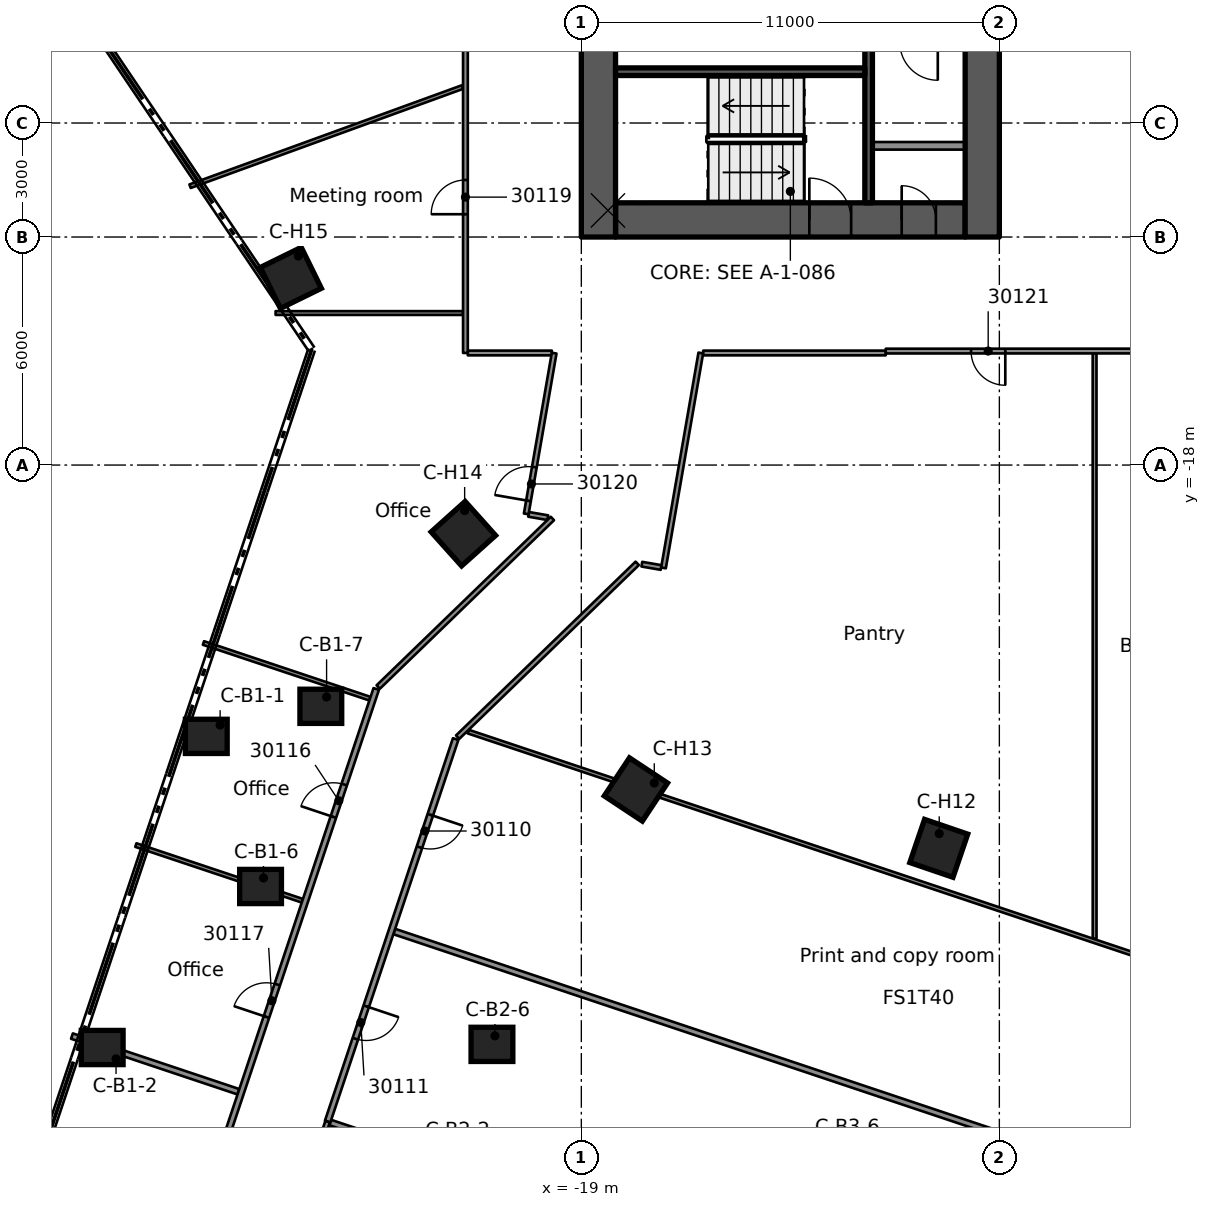
"""IFC4 building model, lengths in metres.
Left out: names, types, materials, properties, quantities, classifications, styles, units other than length and angle.
Written with IfcOpenShell. Run it as: python <this file> out.ifc"""

import sys

from ifc_helpers import new_model, si_unit, direction, frame, frame_2d, origin, origin_2d, place, context, subcontext, project, spatial, rectangle, extrude, element, fill, save


model = new_model("IFC4")
c1 = context("Model", 3, precision=1e-05, world=origin(), true_north=direction((0.0, 1.0)))
c2 = subcontext(c1, "Body", "Model", "MODEL_VIEW")
j1 = project(units=[si_unit("LENGTHUNIT", "METRE"), si_unit("PLANEANGLEUNIT", "RADIAN")], contexts=[c1])
p1 = place(None, origin())
s1 = spatial("IfcSite", under=j1, at=p1, CompositionType="ELEMENT")
p2 = place(p1, origin())
s2 = spatial("IfcBuilding", under=s1, at=p2, CompositionType="ELEMENT")
p3 = place(p2, frame((0.0, 0.0, 152.6)))
s3 = spatial("IfcBuildingStorey", under=s2, at=p3, CompositionType="ELEMENT", Elevation=152.6)
p4 = place(p3, frame((-18.1, -11.55, 0.0), z_axis=(0.0, 0.0, 1.0), x_axis=(1.0, 0.0, 0.0)))
e1 = element("IfcWall", 1, at=p4, inside=s3, PredefinedType="SHEAR", context=c2, shape_type="SweptSolid", body=[
    extrude(rectangle(XDim=9.2, YDim=0.9, at=frame_2d((4.6, 0.0))), origin(), (0.0, 0.0, 1.0), 3.5),
])
p5 = place(p4, frame((5.1, 0.0, 0.0)))
e2 = element("IfcOpeningElement", 2, at=p5, cuts=e1, PredefinedType="OPENING", context=c2, shape_type="SweptSolid", body=[
    extrude(rectangle(XDim=1.1, YDim=2.1, at=frame_2d((0.55, 1.05))), frame((0.0, 0.46, 0.0), z_axis=(0.0, -1.0, 0.0), x_axis=(1.0, 0.0, 0.0)), (0.0, 0.0, 1.0), 0.92),
])
p6 = place(p4, frame((7.53, 0.0, 0.0)))
e3 = element("IfcOpeningElement", 3, at=p6, cuts=e1, PredefinedType="OPENING", context=c2, shape_type="SweptSolid", body=[
    extrude(rectangle(XDim=0.9, YDim=2.1, at=frame_2d((0.45, 1.05))), frame((0.0, 0.46, 0.0), z_axis=(0.0, -1.0, 0.0), x_axis=(1.0, 0.0, 0.0)), (0.0, 0.0, 1.0), 0.92),
])
p7 = place(p3, frame((-18.55, -12.0, 0.0), z_axis=(0.0, 0.0, 1.0), x_axis=(0.0, 1.0, 0.0)))
e4 = element("IfcWall", 4, at=p7, inside=s3, PredefinedType="SHEAR", context=c2, shape_type="SweptSolid", body=[
    extrude(rectangle(XDim=24.0, YDim=0.9, at=frame_2d((12.0, 0.0))), origin(), (0.0, 0.0, 1.0), 3.5),
])
p8 = place(p7, frame((10.1, 0.0, 0.0)))
e5 = element("IfcOpeningElement", 5, at=p8, cuts=e4, PredefinedType="OPENING", context=c2, shape_type="SweptSolid", body=[
    extrude(rectangle(XDim=1.8, YDim=2.1, at=frame_2d((0.9, 1.05))), frame((0.0, 0.46, 0.0), z_axis=(0.0, -1.0, 0.0), x_axis=(1.0, 0.0, 0.0)), (0.0, 0.0, 1.0), 0.92),
])
p9 = place(p3, frame((-8.45, -12.0, 0.0), z_axis=(0.0, 0.0, 1.0), x_axis=(0.0, 1.0, 0.0)))
e6 = element("IfcWall", 6, at=p9, inside=s3, PredefinedType="SHEAR", context=c2, shape_type="SweptSolid", body=[
    extrude(rectangle(XDim=24.0, YDim=0.9, at=frame_2d((12.0, 0.0))), origin(), (0.0, 0.0, 1.0), 3.5),
])
p10 = place(p9, frame((9.6, 0.0, 0.0)))
e7 = element("IfcOpeningElement", 7, at=p10, cuts=e6, PredefinedType="OPENING", context=c2, shape_type="SweptSolid", body=[
    extrude(rectangle(XDim=1.8, YDim=2.1, at=frame_2d((0.9, 1.05))), frame((0.0, 0.46, 0.0), z_axis=(0.0, -1.0, 0.0), x_axis=(1.0, 0.0, 0.0)), (0.0, 0.0, 1.0), 0.92),
])
p11 = place(p9, frame((19.65, 0.0, 0.0)))
e8 = element("IfcOpeningElement", 8, at=p11, cuts=e6, PredefinedType="OPENING", context=c2, shape_type="SweptSolid", body=[
    extrude(rectangle(XDim=1.1, YDim=2.1, at=frame_2d((0.55, 1.05))), frame((0.0, 0.46, 0.0), z_axis=(0.0, -1.0, 0.0), x_axis=(1.0, 0.0, 0.0)), (0.0, 0.0, 1.0), 0.92),
])
for number, where, z_axis, x_axis in (
    (9, (-28.869, -25.139, 0.0), (0.0, 0.0, 1.0), (1.0, 0.0, 0.0)),
    (10, (-31.608, -33.326, 0.0), (0.0, 0.0, 1.0), (1.0, 0.0, 0.0)),
    (11, (-27.441, -29.089, 0.0), (0.0, 0.0, 1.0), (1.0, 0.0, 0.0)),
    (12, (-25.855, -24.348, 0.0), (0.0, 0.0, 1.0), (1.0, 0.0, 0.0)),
    (13, (-21.352, -33.243, 0.0), (0.0, 0.0, 1.0), (1.0, 0.0, 0.0)),
):
    element("IfcColumn", number, at=place(p3, frame(where, z_axis=z_axis, x_axis=x_axis)), inside=s3, PredefinedType="COLUMN", context=c2, shape_type="SweptSolid", body=[
        extrude(rectangle(XDim=1.1, YDim=0.9, at=origin_2d()), origin(), (0.0, 0.0, 1.0), 3.5),
    ])
for number, where, z_axis, x_axis in (
    (14, (-9.594, -28.085, 0.0), (0.0, 0.0, 1.0), (-0.323, -0.946, 0.0)),
    (15, (-17.564, -26.536, 0.0), (0.0, 0.0, 1.0), (-0.552, -0.834, 0.0)),
    (16, (-22.104, -19.806, 0.0), (0.0, 0.0, 1.0), (-0.745, -0.667, 0.0)),
    (17, (-26.644, -13.075, 0.0), (0.0, 0.0, 1.0), (-0.898, -0.441, 0.0)),
):
    element("IfcColumn", number, at=place(p3, frame(where, z_axis=z_axis, x_axis=x_axis)), inside=s3, PredefinedType="COLUMN", context=c2, shape_type="SweptSolid", body=[
        extrude(rectangle(XDim=1.2, YDim=1.2, at=origin_2d()), origin(), (0.0, 0.0, 1.0), 3.5),
    ])
p12 = place(p3, frame((-11.44, -11.1, 0.0), z_axis=(0.0, 0.0, 1.0), x_axis=(0.0, 1.0, 0.0)))
e18 = element("IfcWall", 18, at=p12, inside=s3, PredefinedType="SOLIDWALL", context=c2, shape_type="SweptSolid", body=[
    extrude(rectangle(XDim=4.125, YDim=0.2, at=frame_2d((2.062, 0.0))), origin(), (0.0, 0.0, 1.0), 3.09),
])
p13 = place(p3, frame((-11.54, -7.65, 0.0), z_axis=(0.0, 0.0, 1.0), x_axis=(-1.0, 0.0, 0.0)))
e19 = element("IfcWall", 19, at=p13, inside=s3, PredefinedType="SOLIDWALL", context=c2, shape_type="SweptSolid", body=[
    extrude(rectangle(XDim=6.56, YDim=0.2, at=frame_2d((3.28, 0.0))), origin(), (0.0, 0.0, 1.0), 3.09),
])
p14 = place(p3, frame((-8.9, -9.6, 0.0), z_axis=(0.0, 0.0, 1.0), x_axis=(-1.0, 0.0, 0.0)))
e20 = element("IfcWall", 20, at=p14, inside=s3, PredefinedType="PARTITIONING", context=c2, shape_type="SweptSolid", body=[
    extrude(rectangle(XDim=2.44, YDim=0.2, at=frame_2d((1.22, 0.0))), origin(), (0.0, 0.0, 1.0), 3.09),
])
p15 = place(p3, frame((-5.494, -15.062, 0.0), z_axis=(0.0, 0.0, 1.0), x_axis=(6.3425617e-05, -0.999999997989, 0.0)))
e21 = element("IfcWall", 21, at=p15, inside=s3, PredefinedType="PARTITIONING", context=c2, shape_type="SweptSolid", body=[
    extrude(rectangle(XDim=15.397, YDim=0.1, at=frame_2d((7.698, 0.0))), origin(), (0.0, 0.0, 1.0), 3.08),
])
p16 = place(p3, frame((-32.404, -33.025, 0.0), z_axis=(0.0, 0.0, 1.0), x_axis=(0.948376327841, -0.317147191049, 0.0)))
e22 = element("IfcWall", 22, at=p16, inside=s3, PredefinedType="PARTITIONING", context=c2, shape_type="SweptSolid", body=[
    extrude(rectangle(XDim=4.62, YDim=0.15, at=frame_2d((2.31, 0.0))), origin(), (0.0, 0.0, 1.0), 3.08),
])
p17 = place(p3, frame((-25.605, -35.3, 0.0), z_axis=(0.0, 0.0, 1.0), x_axis=(0.948327152728, -0.317294203223, 0.0)))
e23 = element("IfcWall", 23, at=p17, inside=s3, PredefinedType="PARTITIONING", context=c2, shape_type="SweptSolid", body=[
    extrude(rectangle(XDim=26.162, YDim=0.15, at=frame_2d((13.081, 0.0))), origin(), (0.0, 0.0, 1.0), 3.08),
])
p18 = place(p3, frame((-30.722, -27.999, 0.0), z_axis=(0.0, 0.0, 1.0), x_axis=(0.948349739438, -0.317226688203, 0.0)))
e24 = element("IfcWall", 24, at=p18, inside=s3, PredefinedType="PARTITIONING", context=c2, shape_type="SweptSolid", body=[
    extrude(rectangle(XDim=4.618, YDim=0.1, at=frame_2d((2.309, 0.0))), origin(), (0.0, 0.0, 1.0), 3.08),
])
p19 = place(p3, frame((-23.923, -30.274, 0.0), z_axis=(0.0, 0.0, 1.0), x_axis=(0.948327152728, -0.317294203223, 0.0)))
e25 = element("IfcWall", 25, at=p19, inside=s3, PredefinedType="PARTITIONING", context=c2, shape_type="SweptSolid", body=[
    extrude(rectangle(XDim=26.162, YDim=0.15, at=frame_2d((13.081, 0.0))), origin(), (0.0, 0.0, 1.0), 3.08),
])
p20 = place(p3, frame((-28.943, -22.682, 0.0), z_axis=(0.0, 0.0, 1.0), x_axis=(0.948355058718, -0.317210785763, 0.0)))
e26 = element("IfcWall", 26, at=p20, inside=s3, PredefinedType="PARTITIONING", context=c2, shape_type="SweptSolid", body=[
    extrude(rectangle(XDim=4.619, YDim=0.1, at=frame_2d((2.309, 0.0))), origin(), (0.0, 0.0, 1.0), 3.08),
])
p21 = place(p3, frame((-21.98, -25.012, 0.0), z_axis=(0.0, 0.0, 1.0), x_axis=(0.948316725504, -0.31732536635, 0.0)))
e27 = element("IfcWall", 27, at=p21, inside=s3, PredefinedType="PARTITIONING", context=c2, shape_type="SweptSolid", body=[
    extrude(rectangle(XDim=25.819, YDim=0.1, at=frame_2d((12.91, 0.0))), origin(), (0.0, 0.0, 1.0), 3.08),
])
p22 = place(p3, frame((-17.408, -20.608, 0.0), z_axis=(0.0, 0.0, 1.0), x_axis=(0.985229157149, -0.171241081238, 0.0)))
e28 = element("IfcWall", 28, at=p22, inside=s3, PredefinedType="PARTITIONING", context=c2, shape_type="SweptSolid", body=[
    extrude(rectangle(XDim=0.515, YDim=0.125, at=frame_2d((0.257, 0.0))), origin(), (0.0, 0.0, 1.0), 3.08),
])
p23 = place(p3, frame((-20.387, -19.297, 0.0), z_axis=(0.0, 0.0, 1.0), x_axis=(0.985183769906, -0.171502010235, 0.0)))
e29 = element("IfcWall", 29, at=p23, inside=s3, PredefinedType="PARTITIONING", context=c2, shape_type="SweptSolid", body=[
    extrude(rectangle(XDim=0.512, YDim=0.125, at=frame_2d((0.256, 0.0))), origin(), (0.0, 0.0, 1.0), 3.08),
])
p24 = place(p3, frame((-21.988, -15.051, 0.0), z_axis=(0.0, 0.0, 1.0), x_axis=(1.0, 0.0, 0.0)))
e30 = element("IfcWall", 30, at=p24, inside=s3, PredefinedType="PARTITIONING", context=c2, shape_type="SweptSolid", body=[
    extrude(rectangle(XDim=2.212, YDim=0.125, at=frame_2d((1.106, 0.0))), origin(), (0.0, 0.0, 1.0), 3.08),
])
p25 = place(p3, frame((-15.793, -15.051, 0.0), z_axis=(0.0, 0.0, 1.0), x_axis=(1.0, 0.0, 0.0)))
e31 = element("IfcWall", 31, at=p25, inside=s3, PredefinedType="PARTITIONING", context=c2, shape_type="SweptSolid", body=[
    extrude(rectangle(XDim=4.802, YDim=0.125, at=frame_2d((2.401, 0.0))), origin(), (0.0, 0.0, 1.0), 3.08),
])
p26 = place(p3, frame((4.091, -14.998, 0.0), z_axis=(0.0, 0.0, 1.0), x_axis=(-0.999999981131, -0.000194262769, 0.0)))
e32 = element("IfcWall", 32, at=p26, inside=s3, PredefinedType="PARTITIONING", context=c2, shape_type="SweptSolid", body=[
    extrude(rectangle(XDim=15.081, YDim=0.125, at=frame_2d((7.541, 0.0))), origin(), (0.0, 0.0, 1.0), 3.08),
])
p27 = place(p26, frame((11.935, 0.0, 0.0)))
e33 = element("IfcOpeningElement", 33, at=p27, cuts=e32, PredefinedType="OPENING", context=c2, shape_type="SweptSolid", body=[
    extrude(rectangle(XDim=0.9, YDim=2.1, at=frame_2d((0.45, 1.05))), frame((0.0, 0.073, 0.0), z_axis=(0.0, -1.0, 0.0), x_axis=(1.0, 0.0, 0.0)), (0.0, 0.0, 1.0), 0.145),
])
p28 = place(p26, frame((6.191, 0.0, 0.0)))
e34 = element("IfcOpeningElement", 34, at=p28, cuts=e32, PredefinedType="OPENING", context=c2, shape_type="SweptSolid", body=[
    extrude(rectangle(XDim=1.1, YDim=2.1, at=frame_2d((0.55, 1.05))), frame((0.0, 0.073, 0.0), z_axis=(0.0, -1.0, 0.0), x_axis=(1.0, 0.0, 0.0)), (0.0, 0.0, 1.0), 0.145),
])
p29 = place(p3, frame((-27.045, -14.0, 0.0), z_axis=(0.0, 0.0, 1.0), x_axis=(1.0, 0.0, 0.0)))
e35 = element("IfcWall", 35, at=p29, inside=s3, PredefinedType="PARTITIONING", context=c2, shape_type="SweptSolid", body=[
    extrude(rectangle(XDim=4.932, YDim=0.1, at=frame_2d((2.466, 0.0))), origin(), (0.0, 0.0, 1.0), 3.08),
])
p30 = place(p3, frame((-29.296, -10.663, 0.0), z_axis=(0.0, 0.0, 1.0), x_axis=(0.9396952375, 0.342012953877, 0.0)))
e36 = element("IfcWall", 36, at=p30, inside=s3, PredefinedType="PARTITIONING", context=c2, shape_type="SweptSolid", body=[
    extrude(rectangle(XDim=7.626, YDim=0.1, at=frame_2d((3.813, 0.0))), origin(), (0.0, 0.0, 1.0), 3.08),
])
p31 = place(p3, frame((-17.529, -20.587, 0.0), z_axis=(0.0, 0.0, 1.0), x_axis=(-0.71863386664, -0.69538864365, 0.0)))
e37 = element("IfcWall", 37, at=p31, inside=s3, PredefinedType="PARTITIONING", context=c2, shape_type="SweptSolid", body=[
    extrude(rectangle(XDim=6.575, YDim=0.125, at=frame_2d((3.287, 0.0))), origin(), (0.0, 0.0, 1.0), 3.08),
])
p32 = place(p3, frame((-24.345, -23.841, 0.0), z_axis=(0.0, 0.0, 1.0), x_axis=(0.718684819468, 0.695335983727, 0.0)))
e38 = element("IfcWall", 38, at=p32, inside=s3, PredefinedType="PARTITIONING", context=c2, shape_type="SweptSolid", body=[
    extrude(rectangle(XDim=6.378, YDim=0.125, at=frame_2d((3.189, 0.0))), origin(), (0.0, 0.0, 1.0), 3.08),
])
p33 = place(p3, frame((-22.307, -25.21, 0.0), z_axis=(0.0, 0.0, 1.0), x_axis=(-0.317400526235, -0.948291572221, 0.0)))
e39 = element("IfcWall", 39, at=p33, inside=s3, PredefinedType="PARTITIONING", context=c2, shape_type="SweptSolid", body=[
    extrude(rectangle(XDim=10.615, YDim=0.15, at=frame_2d((5.307, 0.0))), origin(), (0.0, 0.0, 1.0), 3.08),
])
p34 = place(p33, frame((2.101, 0.0, 0.0)))
e40 = element("IfcOpeningElement", 40, at=p34, cuts=e39, PredefinedType="OPENING", context=c2, shape_type="SweptSolid", body=[
    extrude(rectangle(XDim=0.9, YDim=2.1, at=frame_2d((0.45, 1.05))), frame((0.0, 0.085, 0.0), z_axis=(0.0, -1.0, 0.0), x_axis=(1.0, 0.0, 0.0)), (0.0, 0.0, 1.0), 0.17),
])
p35 = place(p33, frame((7.414, 0.0, 0.0)))
e41 = element("IfcOpeningElement", 41, at=p35, cuts=e39, PredefinedType="OPENING", context=c2, shape_type="SweptSolid", body=[
    extrude(rectangle(XDim=0.9, YDim=2.1, at=frame_2d((0.45, 1.05))), frame((0.0, 0.085, 0.0), z_axis=(0.0, -1.0, 0.0), x_axis=(1.0, 0.0, 0.0)), (0.0, 0.0, 1.0), 0.17),
])
p36 = place(p3, frame((-25.96, -36.126, 0.0), z_axis=(0.0, 0.0, 1.0), x_axis=(0.316799745903, 0.948492446462, 0.0)))
e42 = element("IfcWall", 42, at=p36, inside=s3, PredefinedType="PARTITIONING", context=c2, shape_type="SweptSolid", body=[
    extrude(rectangle(XDim=0.896, YDim=0.125, at=frame_2d((0.448, 0.0))), origin(), (0.0, 0.0, 1.0), 3.08),
])
p37 = place(p3, frame((-31.507, -45.135, 0.0), z_axis=(0.0, 0.0, 1.0), x_axis=(0.317398027953, 0.948292408412, 0.0)))
e43 = element("IfcWall", 43, at=p37, inside=s3, PredefinedType="PARTITIONING", context=c2, shape_type="SweptSolid", body=[
    extrude(rectangle(XDim=22.401, YDim=0.15, at=frame_2d((11.201, 0.0))), origin(), (0.0, 0.0, 1.0), 3.08),
])
p38 = place(p37, frame((18.85, 0.0, 0.0)))
e44 = element("IfcOpeningElement", 44, at=p38, cuts=e43, PredefinedType="OPENING", context=c2, shape_type="SweptSolid", body=[
    extrude(rectangle(XDim=0.9, YDim=2.1, at=frame_2d((0.45, 1.05))), frame((0.0, 0.085, 0.0), z_axis=(0.0, -1.0, 0.0), x_axis=(1.0, 0.0, 0.0)), (0.0, 0.0, 1.0), 0.17),
])
p39 = place(p37, frame((13.3, 0.0, 0.0)))
e45 = element("IfcOpeningElement", 45, at=p39, cuts=e43, PredefinedType="OPENING", context=c2, shape_type="SweptSolid", body=[
    extrude(rectangle(XDim=0.9, YDim=2.1, at=frame_2d((0.45, 1.05))), frame((0.0, 0.085, 0.0), z_axis=(0.0, -1.0, 0.0), x_axis=(1.0, 0.0, 0.0)), (0.0, 0.0, 1.0), 0.17),
])
p40 = place(p3, frame((-15.856, -15.051, 0.0), z_axis=(0.0, 0.0, 1.0), x_axis=(-0.171050411477, -0.985262278144, 0.0)))
e46 = element("IfcWall", 46, at=p40, inside=s3, PredefinedType="PARTITIONING", context=c2, shape_type="SweptSolid", body=[
    extrude(rectangle(XDim=5.741, YDim=0.125, at=frame_2d((2.87, 0.0))), origin(), (0.0, 0.0, 1.0), 3.08),
])
p41 = place(p3, frame((-20.45, -19.286, 0.0), z_axis=(0.0, 0.0, 1.0), x_axis=(0.171125236447, 0.985249284928, 0.0)))
e47 = element("IfcWall", 47, at=p41, inside=s3, PredefinedType="PARTITIONING", context=c2, shape_type="SweptSolid", body=[
    extrude(rectangle(XDim=4.294, YDim=0.125, at=frame_2d((2.147, 0.0))), origin(), (0.0, 0.0, 1.0), 3.08),
])
p42 = place(p41, frame((0.35, 0.0, 0.0)))
e48 = element("IfcOpeningElement", 48, at=p42, cuts=e47, PredefinedType="OPENING", context=c2, shape_type="SweptSolid", body=[
    extrude(rectangle(XDim=0.9, YDim=2.1, at=frame_2d((0.45, 1.05))), frame((0.0, 0.073, 0.0), z_axis=(0.0, -1.0, 0.0), x_axis=(1.0, 0.0, 0.0)), (0.0, 0.0, 1.0), 0.145),
])
p43 = place(p3, frame((-22.05, -15.051, 0.0), z_axis=(0.0, 0.0, 1.0), x_axis=(0.0, 1.0, 0.0)))
e49 = element("IfcWall", 49, at=p43, inside=s3, PredefinedType="PARTITIONING", context=c2, shape_type="SweptSolid", body=[
    extrude(rectangle(XDim=30.102, YDim=0.125, at=frame_2d((15.051, 0.0))), origin(), (0.0, 0.0, 1.0), 3.08),
])
p44 = place(p43, frame((14.625, 0.0, 0.0)))
e50 = element("IfcOpeningElement", 50, at=p44, cuts=e49, PredefinedType="OPENING", context=c2, shape_type="SweptSolid", body=[
    extrude(rectangle(XDim=0.9, YDim=2.1, at=frame_2d((0.45, 1.05))), frame((0.0, 0.073, 0.0), z_axis=(0.0, -1.0, 0.0), x_axis=(1.0, 0.0, 0.0)), (0.0, 0.0, 1.0), 0.145),
])
p45 = place(p43, frame((3.651, 0.0, 0.0)))
e51 = element("IfcOpeningElement", 51, at=p45, cuts=e49, PredefinedType="OPENING", context=c2, shape_type="SweptSolid", body=[
    extrude(rectangle(XDim=0.9, YDim=2.1, at=frame_2d((0.45, 1.05))), frame((0.0, 0.073, 0.0), z_axis=(0.0, -1.0, 0.0), x_axis=(1.0, 0.0, 0.0)), (0.0, 0.0, 1.0), 0.145),
])
p46 = place(p43, frame((25.677, 0.0, 0.0)))
e52 = element("IfcOpeningElement", 52, at=p46, cuts=e49, PredefinedType="OPENING", context=c2, shape_type="SweptSolid", body=[
    extrude(rectangle(XDim=0.9, YDim=2.1, at=frame_2d((0.45, 1.05))), frame((0.0, 0.073, 0.0), z_axis=(0.0, -1.0, 0.0), x_axis=(1.0, 0.0, 0.0)), (0.0, 0.0, 1.0), 0.145),
])
p47 = place(p5, origin())
e53 = element("IfcDoor", 53, at=p47, inside=s3, OperationType="SINGLE_SWING_RIGHT", PredefinedType="DOOR", context=c2, shape_type="SweptSolid", body=[
    extrude(rectangle(XDim=1.1, YDim=2.1, at=frame_2d((0.55, 1.05))), frame((0.0, 0.025, 0.0), z_axis=(0.0, -1.0, 0.0), x_axis=(1.0, 0.0, 0.0)), (0.0, 0.0, 1.0), 0.05),
])
fill(e2, e53)
p48 = place(p6, origin())
e54 = element("IfcDoor", 54, at=p48, inside=s3, OperationType="SINGLE_SWING_RIGHT", PredefinedType="DOOR", context=c2, shape_type="SweptSolid", body=[
    extrude(rectangle(XDim=0.9, YDim=2.1, at=frame_2d((0.45, 1.05))), frame((0.0, 0.025, 0.0), z_axis=(0.0, -1.0, 0.0), x_axis=(1.0, 0.0, 0.0)), (0.0, 0.0, 1.0), 0.05),
])
fill(e3, e54)
p49 = place(p34, origin())
e55 = element("IfcDoor", 55, at=p49, inside=s3, OperationType="SINGLE_SWING_LEFT", PredefinedType="DOOR", context=c2, shape_type="SweptSolid", body=[
    extrude(rectangle(XDim=0.9, YDim=2.1, at=frame_2d((0.45, 1.05))), frame((0.0, 0.025, 0.0), z_axis=(0.0, -1.0, 0.0), x_axis=(1.0, 0.0, 0.0)), (0.0, 0.0, 1.0), 0.05),
])
fill(e40, e55)
p50 = place(p35, origin())
e56 = element("IfcDoor", 56, at=p50, inside=s3, OperationType="SINGLE_SWING_RIGHT", PredefinedType="DOOR", context=c2, shape_type="SweptSolid", body=[
    extrude(rectangle(XDim=0.9, YDim=2.1, at=frame_2d((0.45, 1.05))), frame((0.0, 0.025, 0.0), z_axis=(0.0, -1.0, 0.0), x_axis=(1.0, 0.0, 0.0)), (0.0, 0.0, 1.0), 0.05),
])
fill(e41, e56)
p51 = place(p38, origin())
e57 = element("IfcDoor", 57, at=p51, inside=s3, OperationType="SINGLE_SWING_RIGHT", PredefinedType="DOOR", context=c2, shape_type="SweptSolid", body=[
    extrude(rectangle(XDim=0.9, YDim=2.1, at=frame_2d((0.45, 1.05))), frame((0.0, 0.025, 0.0), z_axis=(0.0, -1.0, 0.0), x_axis=(1.0, 0.0, 0.0)), (0.0, 0.0, 1.0), 0.05),
])
fill(e44, e57)
p52 = place(p39, origin())
e58 = element("IfcDoor", 58, at=p52, inside=s3, OperationType="SINGLE_SWING_RIGHT", PredefinedType="DOOR", context=c2, shape_type="SweptSolid", body=[
    extrude(rectangle(XDim=0.9, YDim=2.1, at=frame_2d((0.45, 1.05))), frame((0.0, 0.025, 0.0), z_axis=(0.0, -1.0, 0.0), x_axis=(1.0, 0.0, 0.0)), (0.0, 0.0, 1.0), 0.05),
])
fill(e45, e58)
p53 = place(p45, origin())
e59 = element("IfcDoor", 59, at=p53, inside=s3, OperationType="SINGLE_SWING_LEFT", PredefinedType="DOOR", context=c2, shape_type="SweptSolid", body=[
    extrude(rectangle(XDim=0.9, YDim=2.1, at=frame_2d((0.45, 1.05))), frame((0.0, 0.025, 0.0), z_axis=(0.0, -1.0, 0.0), x_axis=(1.0, 0.0, 0.0)), (0.0, 0.0, 1.0), 0.05),
])
fill(e51, e59)
p54 = place(p42, origin())
e60 = element("IfcDoor", 60, at=p54, inside=s3, OperationType="SINGLE_SWING_LEFT", PredefinedType="DOOR", context=c2, shape_type="SweptSolid", body=[
    extrude(rectangle(XDim=0.9, YDim=2.1, at=frame_2d((0.45, 1.05))), frame((0.0, 0.025, 0.0), z_axis=(0.0, -1.0, 0.0), x_axis=(1.0, 0.0, 0.0)), (0.0, 0.0, 1.0), 0.05),
])
fill(e48, e60)
p55 = place(p27, origin())
e61 = element("IfcDoor", 61, at=p55, inside=s3, OperationType="SINGLE_SWING_RIGHT", PredefinedType="DOOR", context=c2, shape_type="SweptSolid", body=[
    extrude(rectangle(XDim=0.9, YDim=2.1, at=frame_2d((0.45, 1.05))), frame((0.0, 0.025, 0.0), z_axis=(0.0, -1.0, 0.0), x_axis=(1.0, 0.0, 0.0)), (0.0, 0.0, 1.0), 0.05),
])
fill(e33, e61)
save(model, sys.argv[1])
